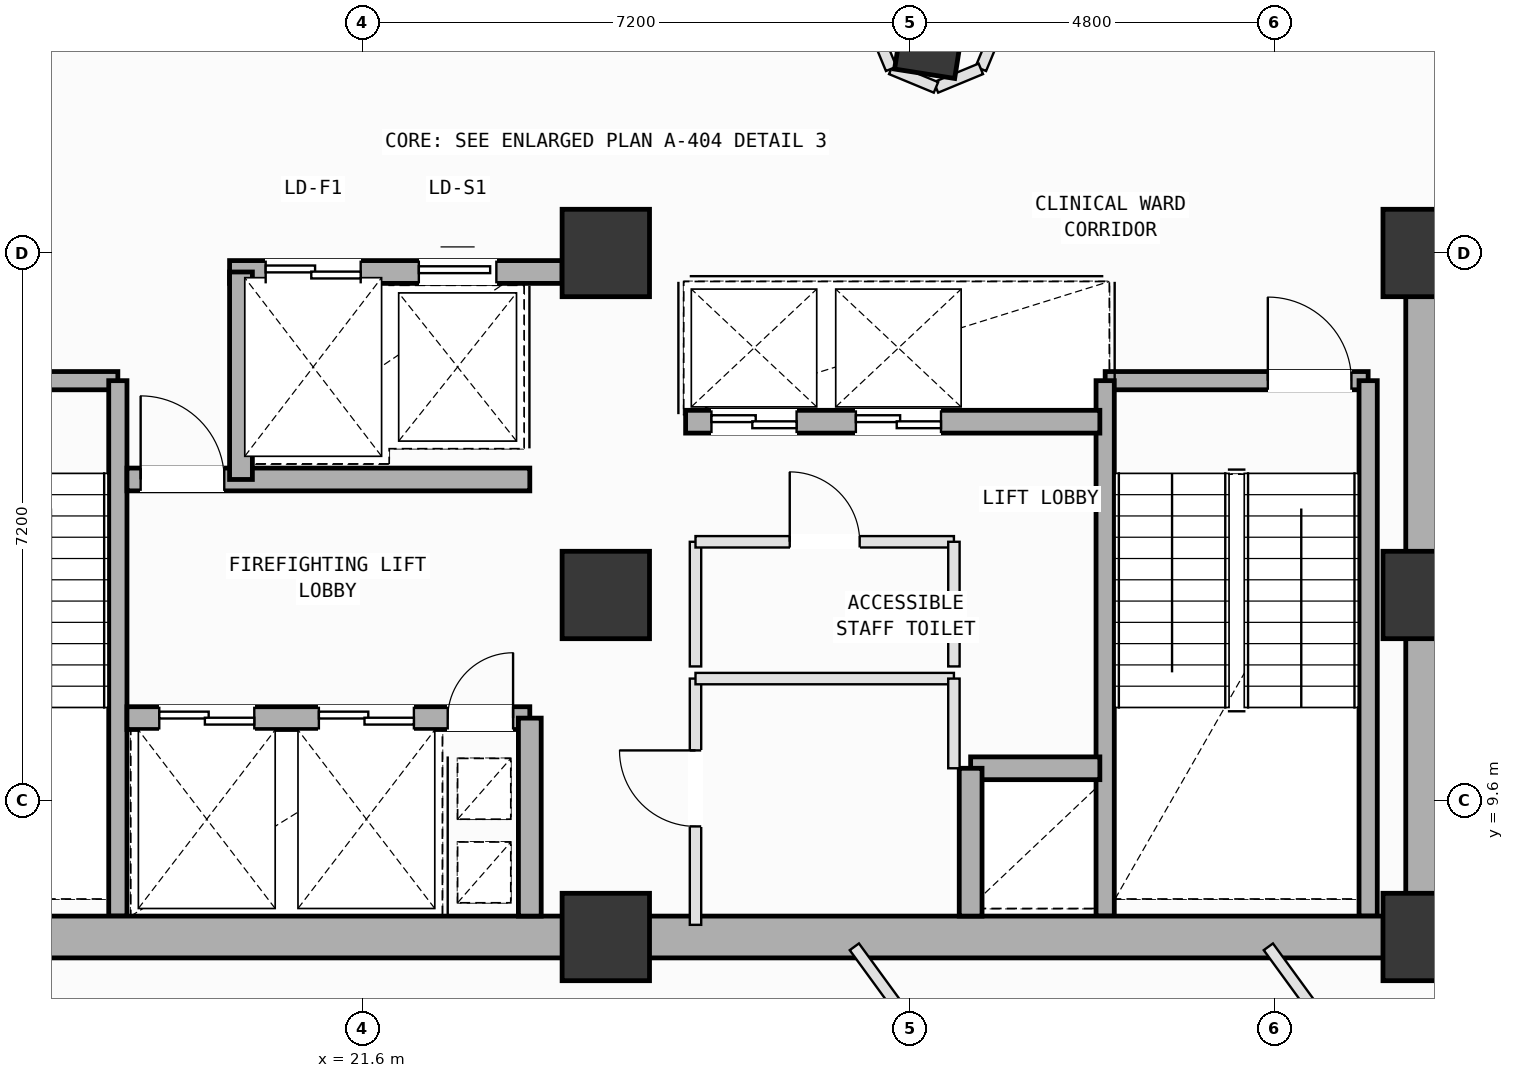
"""IFC4 building model, lengths in metres.
Left out: names, types, materials, properties, quantities, classifications, styles, units other than length and angle.
Written with IfcOpenShell. Run it as: python <this file> out.ifc"""

import sys

from ifc_helpers import new_model, si_unit, direction, frame, frame_2d, origin, origin_2d, place, context, subcontext, project, spatial, rectangle, extrude, element, fill, save


model = new_model("IFC4")
c1 = context("Model", 3, precision=1e-05, world=origin(), true_north=direction((0.0, 1.0)))
c2 = subcontext(c1, "Body", "Model", "MODEL_VIEW")
j1 = project(units=[si_unit("LENGTHUNIT", "METRE"), si_unit("PLANEANGLEUNIT", "RADIAN")], contexts=[c1])
p1 = place(None, origin())
s1 = spatial("IfcSite", under=j1, at=p1, CompositionType="ELEMENT")
p2 = place(p1, origin())
s2 = spatial("IfcBuilding", under=s1, at=p2, CompositionType="ELEMENT")
p3 = place(p2, frame((0.0, 0.0, 177.8)))
s3 = spatial("IfcBuildingStorey", under=s2, at=p3, CompositionType="ELEMENT", Elevation=177.8)
for number, where, z_axis, x_axis in (
    (1, (24.8, 7.8, 0.0), (0.0, 0.0, 1.0), (1.0, 0.0, 0.0)),
    (2, (24.8, 12.3, 0.0), (0.0, 0.0, 1.0), (1.0, 0.0, 0.0)),
    (3, (24.8, 16.8, 0.0), (0.0, 0.0, 1.0), (1.0, 0.0, 0.0)),
    (4, (35.6, 7.8, 0.0), (0.0, 0.0, 1.0), (1.0, 0.0, 0.0)),
    (5, (35.6, 12.3, 0.0), (0.0, 0.0, 1.0), (1.0, 0.0, 0.0)),
    (6, (35.6, 16.8, 0.0), (0.0, 0.0, 1.0), (1.0, 0.0, 0.0)),
):
    element("IfcColumn", number, at=place(p3, frame(where, z_axis=z_axis, x_axis=x_axis)), inside=s3, PredefinedType="COLUMN", context=c2, shape_type="SweptSolid", body=[
        extrude(rectangle(XDim=1.15, YDim=1.15, at=origin_2d()), origin(), (0.0, 0.0, 1.0), 4.0),
    ])
p4 = place(p3, frame((29.103, 19.85, 0.002), z_axis=(0.020701917139, -0.018442415858, 0.999615580073), x_axis=(-0.634495197242, 0.772441293225, 0.027391480385)))
e7 = element("IfcColumn", 7, at=p4, inside=s3, PredefinedType="COLUMN", context=c2, shape_type="SweptSolid", body=[
    extrude(rectangle(XDim=1.4, YDim=0.8, at=origin_2d()), origin(), (0.0, 0.0, 1.0), 3.998),
])
p5 = place(p3, frame((14.92, 15.12, 0.0), z_axis=(0.0, 0.0, 1.0), x_axis=(1.0, 0.0, 0.0)))
e8 = element("IfcWall", 8, at=p5, inside=s3, PredefinedType="SOLIDWALL", context=c2, shape_type="SweptSolid", body=[
    extrude(rectangle(XDim=3.46, YDim=0.24, at=frame_2d((1.73, 0.0))), origin(), (0.0, 0.0, 1.0), 3.78),
])
p6 = place(p5, frame((0.22, 0.0, 0.0)))
e9 = element("IfcOpeningElement", 9, at=p6, cuts=e8, PredefinedType="OPENING", context=c2, shape_type="SweptSolid", body=[
    extrude(rectangle(XDim=1.1, YDim=2.15, at=frame_2d((0.55, 1.075))), frame((0.0, 0.13, 0.0), z_axis=(0.0, -1.0, 0.0), x_axis=(1.0, 0.0, 0.0)), (0.0, 0.0, 1.0), 0.26),
])
p7 = place(p3, frame((18.38, 15.12, 0.0), z_axis=(0.0, 0.0, 1.0), x_axis=(0.0, -1.0, 0.0)))
e10 = element("IfcWall", 10, at=p7, inside=s3, PredefinedType="SOLIDWALL", context=c2, shape_type="SweptSolid", body=[
    extrude(rectangle(XDim=7.045, YDim=0.24, at=frame_2d((3.522, 0.0))), origin(), (0.0, 0.0, 1.0), 3.78),
])
p8 = place(p3, frame((31.37, 15.12, 0.0), z_axis=(0.0, 0.0, 1.0), x_axis=(1.0, 0.0, 0.0)))
e11 = element("IfcWall", 11, at=p8, inside=s3, PredefinedType="SOLIDWALL", context=c2, shape_type="SweptSolid", body=[
    extrude(rectangle(XDim=3.46, YDim=0.24, at=frame_2d((1.73, 0.0))), origin(), (0.0, 0.0, 1.0), 3.78),
])
p9 = place(p8, frame((2.14, 0.0, 0.0)))
e12 = element("IfcOpeningElement", 12, at=p9, cuts=e11, PredefinedType="OPENING", context=c2, shape_type="SweptSolid", body=[
    extrude(rectangle(XDim=1.1, YDim=2.15, at=frame_2d((0.55, 1.075))), frame((0.0, 0.13, 0.0), z_axis=(0.0, -1.0, 0.0), x_axis=(1.0, 0.0, 0.0)), (0.0, 0.0, 1.0), 0.26),
])
for number, where, z_axis, x_axis in (
    (13, (34.83, 15.12, 0.0), (0.0, 0.0, 1.0), (0.0, -1.0, 0.0)),
    (14, (31.37, 8.075, 0.0), (0.0, 0.0, 1.0), (0.0, 1.0, 0.0)),
):
    element("IfcWall", number, at=place(p3, frame(where, z_axis=z_axis, x_axis=x_axis)), inside=s3, PredefinedType="SOLIDWALL", context=c2, shape_type="SweptSolid", body=[
        extrude(rectangle(XDim=7.045, YDim=0.24, at=frame_2d((3.522, 0.0))), origin(), (0.0, 0.0, 1.0), 3.78),
    ])
for number, where, z_axis, x_axis in (
    (15, (14.0, 7.8, 0.0), (0.0, 0.0, 1.0), (1.0, 0.0, 0.0)),
    (16, (24.8, 7.8, 0.0), (0.0, 0.0, 1.0), (1.0, 0.0, 0.0)),
):
    element("IfcWall", number, at=place(p3, frame(where, z_axis=z_axis, x_axis=x_axis)), inside=s3, PredefinedType="SHEAR", context=c2, shape_type="SweptSolid", body=[
        extrude(rectangle(XDim=10.8, YDim=0.55, at=frame_2d((5.4, 0.0))), origin(), (0.0, 0.0, 1.0), 3.78),
    ])
p10 = place(p3, frame((35.6, 7.8, 0.0), z_axis=(0.0, 0.0, 1.0), x_axis=(0.0, 1.0, 0.0)))
e17 = element("IfcWall", 17, at=p10, inside=s3, PredefinedType="SHEAR", context=c2, shape_type="SweptSolid", body=[
    extrude(rectangle(XDim=9.0, YDim=0.55, at=frame_2d((4.5, 0.0))), origin(), (0.0, 0.0, 1.0), 3.78),
])
p11 = place(p3, frame((19.85, 16.55, 0.0), z_axis=(0.0, 0.0, 1.0), x_axis=(1.0, 0.0, 0.0)))
e18 = element("IfcWall", 18, at=p11, inside=s3, PredefinedType="SOLIDWALL", context=c2, shape_type="SweptSolid", body=[
    extrude(rectangle(XDim=4.375, YDim=0.3, at=frame_2d((2.188, 0.0))), origin(), (0.0, 0.0, 1.0), 3.78),
])
p12 = place(p11, frame((0.475, 0.0, 0.0)))
e19 = element("IfcOpeningElement", 19, at=p12, cuts=e18, PredefinedType="OPENING", context=c2, shape_type="SweptSolid", body=[
    extrude(rectangle(XDim=1.25, YDim=2.18, at=frame_2d((0.625, 1.09))), frame((0.0, 0.16, 0.0), z_axis=(0.0, -1.0, 0.0), x_axis=(1.0, 0.0, 0.0)), (0.0, 0.0, 1.0), 0.32),
])
p13 = place(p11, frame((2.49, 0.0, 0.0)))
e20 = element("IfcOpeningElement", 20, at=p13, cuts=e18, PredefinedType="OPENING", context=c2, shape_type="SweptSolid", body=[
    extrude(rectangle(XDim=1.02, YDim=2.12, at=frame_2d((0.51, 1.06))), frame((0.0, 0.16, 0.0), z_axis=(0.0, -1.0, 0.0), x_axis=(1.0, 0.0, 0.0)), (0.0, 0.0, 1.0), 0.32),
])
p14 = place(p3, frame((18.5, 10.68, 0.0), z_axis=(0.0, 0.0, 1.0), x_axis=(1.0, 0.0, 0.0)))
e21 = element("IfcWall", 21, at=p14, inside=s3, PredefinedType="SOLIDWALL", context=c2, shape_type="SweptSolid", body=[
    extrude(rectangle(XDim=5.3, YDim=0.3, at=frame_2d((2.65, 0.0))), origin(), (0.0, 0.0, 1.0), 3.78),
])
p15 = place(p14, frame((4.22, 0.0, 0.0)))
e22 = element("IfcOpeningElement", 22, at=p15, cuts=e21, PredefinedType="OPENING", context=c2, shape_type="SweptSolid", body=[
    extrude(rectangle(XDim=0.86, YDim=2.06, at=frame_2d((0.43, 1.03))), frame((0.0, 0.16, 0.0), z_axis=(0.0, -1.0, 0.0), x_axis=(1.0, 0.0, 0.0)), (0.0, 0.0, 1.0), 0.32),
])
p16 = place(p14, frame((0.425, 0.0, 0.0)))
e23 = element("IfcOpeningElement", 23, at=p16, cuts=e21, PredefinedType="OPENING", context=c2, shape_type="SweptSolid", body=[
    extrude(rectangle(XDim=1.25, YDim=2.18, at=frame_2d((0.625, 1.09))), frame((0.0, 0.16, 0.0), z_axis=(0.0, -1.0, 0.0), x_axis=(1.0, 0.0, 0.0)), (0.0, 0.0, 1.0), 0.32),
])
p17 = place(p14, frame((2.525, 0.0, 0.0)))
e24 = element("IfcOpeningElement", 24, at=p17, cuts=e21, PredefinedType="OPENING", context=c2, shape_type="SweptSolid", body=[
    extrude(rectangle(XDim=1.25, YDim=2.18, at=frame_2d((0.625, 1.09))), frame((0.0, 0.16, 0.0), z_axis=(0.0, -1.0, 0.0), x_axis=(1.0, 0.0, 0.0)), (0.0, 0.0, 1.0), 0.32),
])
p18 = place(p3, frame((18.5, 13.82, 0.0), z_axis=(0.0, 0.0, 1.0), x_axis=(1.0, 0.0, 0.0)))
e25 = element("IfcWall", 25, at=p18, inside=s3, PredefinedType="SOLIDWALL", context=c2, shape_type="SweptSolid", body=[
    extrude(rectangle(XDim=5.3, YDim=0.3, at=frame_2d((2.65, 0.0))), origin(), (0.0, 0.0, 1.0), 3.78),
])
p19 = place(p18, frame((0.18, 0.0, 0.0)))
e26 = element("IfcOpeningElement", 26, at=p19, cuts=e25, PredefinedType="OPENING", context=c2, shape_type="SweptSolid", body=[
    extrude(rectangle(XDim=1.1, YDim=2.15, at=frame_2d((0.55, 1.075))), frame((0.0, 0.16, 0.0), z_axis=(0.0, -1.0, 0.0), x_axis=(1.0, 0.0, 0.0)), (0.0, 0.0, 1.0), 0.32),
])
p20 = place(p3, frame((23.8, 8.075, 0.0), z_axis=(0.0, 0.0, 1.0), x_axis=(0.0, 1.0, 0.0)))
e27 = element("IfcWall", 27, at=p20, inside=s3, PredefinedType="SOLIDWALL", context=c2, shape_type="SweptSolid", body=[
    extrude(rectangle(XDim=2.605, YDim=0.3, at=frame_2d((1.302, 0.0))), origin(), (0.0, 0.0, 1.0), 3.78),
])
p21 = place(p3, frame((20.0, 13.82, 0.0), z_axis=(0.0, 0.0, 1.0), x_axis=(0.0, 1.0, 0.0)))
e28 = element("IfcWall", 28, at=p21, inside=s3, PredefinedType="SOLIDWALL", context=c2, shape_type="SweptSolid", body=[
    extrude(rectangle(XDim=2.73, YDim=0.3, at=frame_2d((1.365, 0.0))), origin(), (0.0, 0.0, 1.0), 3.78),
])
p22 = place(p3, frame((29.6, 10.02, 0.0), z_axis=(0.0, 0.0, 1.0), x_axis=(1.0, 0.0, 0.0)))
e29 = element("IfcWall", 29, at=p22, inside=s3, PredefinedType="SOLIDWALL", context=c2, shape_type="SweptSolid", body=[
    extrude(rectangle(XDim=1.7, YDim=0.3, at=frame_2d((0.85, 0.0))), origin(), (0.0, 0.0, 1.0), 3.78),
])
p23 = place(p3, frame((29.6, 8.075, 0.0), z_axis=(0.0, 0.0, 1.0), x_axis=(0.0, 1.0, 0.0)))
e30 = element("IfcWall", 30, at=p23, inside=s3, PredefinedType="SOLIDWALL", context=c2, shape_type="SweptSolid", body=[
    extrude(rectangle(XDim=1.945, YDim=0.3, at=frame_2d((0.973, 0.0))), origin(), (0.0, 0.0, 1.0), 3.78),
])
p24 = place(p3, frame((25.85, 14.58, 0.0), z_axis=(0.0, 0.0, 1.0), x_axis=(1.0, 0.0, 0.0)))
e31 = element("IfcWall", 31, at=p24, inside=s3, PredefinedType="SOLIDWALL", context=c2, shape_type="SweptSolid", body=[
    extrude(rectangle(XDim=5.45, YDim=0.3, at=frame_2d((2.725, 0.0))), origin(), (0.0, 0.0, 1.0), 3.78),
])
p25 = place(p24, frame((0.34, 0.0, 0.0)))
e32 = element("IfcOpeningElement", 32, at=p25, cuts=e31, PredefinedType="OPENING", context=c2, shape_type="SweptSolid", body=[
    extrude(rectangle(XDim=1.12, YDim=2.15, at=frame_2d((0.56, 1.075))), frame((0.0, 0.16, 0.0), z_axis=(0.0, -1.0, 0.0), x_axis=(1.0, 0.0, 0.0)), (0.0, 0.0, 1.0), 0.32),
])
p26 = place(p24, frame((2.24, 0.0, 0.0)))
e33 = element("IfcOpeningElement", 33, at=p26, cuts=e31, PredefinedType="OPENING", context=c2, shape_type="SweptSolid", body=[
    extrude(rectangle(XDim=1.12, YDim=2.15, at=frame_2d((0.56, 1.075))), frame((0.0, 0.16, 0.0), z_axis=(0.0, -1.0, 0.0), x_axis=(1.0, 0.0, 0.0)), (0.0, 0.0, 1.0), 0.32),
])
p27 = place(p3, frame((25.98, 7.96, 0.0), z_axis=(0.0, 0.0, 1.0), x_axis=(0.0, 1.0, 0.0)))
e34 = element("IfcWall", 34, at=p27, inside=s3, PredefinedType="PARTITIONING", context=c2, shape_type="SweptSolid", body=[
    extrude(rectangle(XDim=3.24, YDim=0.15, at=frame_2d((1.62, 0.0))), origin(), (0.0, 0.0, 1.0), 3.78),
])
p28 = place(p27, frame((1.295, 0.0, 0.0)))
e35 = element("IfcOpeningElement", 35, at=p28, cuts=e34, PredefinedType="OPENING", context=c2, shape_type="SweptSolid", body=[
    extrude(rectangle(XDim=1.0, YDim=2.12, at=frame_2d((0.5, 1.06))), frame((0.0, 0.085, 0.0), z_axis=(0.0, -1.0, 0.0), x_axis=(1.0, 0.0, 0.0)), (0.0, 0.0, 1.0), 0.17),
])
p29 = place(p3, frame((25.98, 11.2, 0.0), z_axis=(0.0, 0.0, 1.0), x_axis=(1.0, 0.0, 0.0)))
e36 = element("IfcWall", 36, at=p29, inside=s3, PredefinedType="PARTITIONING", context=c2, shape_type="SweptSolid", body=[
    extrude(rectangle(XDim=3.4, YDim=0.15, at=frame_2d((1.7, 0.0))), origin(), (0.0, 0.0, 1.0), 3.78),
])
p30 = place(p3, frame((29.38, 11.2, 0.0), z_axis=(0.0, 0.0, 1.0), x_axis=(0.0, -1.0, 0.0)))
e37 = element("IfcWall", 37, at=p30, inside=s3, PredefinedType="PARTITIONING", context=c2, shape_type="SweptSolid", body=[
    extrude(rectangle(XDim=1.18, YDim=0.15, at=frame_2d((0.59, 0.0))), origin(), (0.0, 0.0, 1.0), 3.78),
])
p31 = place(p3, frame((25.98, 11.36, 0.0), z_axis=(0.0, 0.0, 1.0), x_axis=(0.0, 1.0, 0.0)))
e38 = element("IfcWall", 38, at=p31, inside=s3, PredefinedType="PARTITIONING", context=c2, shape_type="SweptSolid", body=[
    extrude(rectangle(XDim=1.64, YDim=0.15, at=frame_2d((0.82, 0.0))), origin(), (0.0, 0.0, 1.0), 3.78),
])
p32 = place(p3, frame((25.98, 13.0, 0.0), z_axis=(0.0, 0.0, 1.0), x_axis=(1.0, 0.0, 0.0)))
e39 = element("IfcWall", 39, at=p32, inside=s3, PredefinedType="PARTITIONING", context=c2, shape_type="SweptSolid", body=[
    extrude(rectangle(XDim=3.4, YDim=0.15, at=frame_2d((1.7, 0.0))), origin(), (0.0, 0.0, 1.0), 3.78),
])
p33 = place(p32, frame((1.24, 0.0, 0.0)))
e40 = element("IfcOpeningElement", 40, at=p33, cuts=e39, PredefinedType="OPENING", context=c2, shape_type="SweptSolid", body=[
    extrude(rectangle(XDim=0.92, YDim=2.1, at=frame_2d((0.46, 1.05))), frame((0.0, 0.085, 0.0), z_axis=(0.0, -1.0, 0.0), x_axis=(1.0, 0.0, 0.0)), (0.0, 0.0, 1.0), 0.17),
])
p34 = place(p3, frame((29.38, 13.0, 0.0), z_axis=(0.0, 0.0, 1.0), x_axis=(0.0, -1.0, 0.0)))
e41 = element("IfcWall", 41, at=p34, inside=s3, PredefinedType="PARTITIONING", context=c2, shape_type="SweptSolid", body=[
    extrude(rectangle(XDim=1.64, YDim=0.15, at=frame_2d((0.82, 0.0))), origin(), (0.0, 0.0, 1.0), 3.78),
])
p35 = place(p3, frame((28.07, 7.671, 0.0), z_axis=(0.0, 0.0, 1.0), x_axis=(0.589263140304, -0.807941180705, 0.0)))
e42 = element("IfcWall", 42, at=p35, inside=s3, PredefinedType="PARTITIONING", context=c2, shape_type="SweptSolid", body=[
    extrude(rectangle(XDim=11.898, YDim=0.15, at=frame_2d((5.949, 0.0))), origin(), (0.0, 0.0, 1.0), 3.78),
])
p36 = place(p35, frame((5.704, 0.0, 0.0)))
e43 = element("IfcOpeningElement", 43, at=p36, cuts=e42, PredefinedType="OPENING", context=c2, shape_type="SweptSolid", body=[
    extrude(rectangle(XDim=0.86, YDim=2.06, at=frame_2d((0.43, 1.03))), frame((0.0, 0.085, 0.0), z_axis=(0.0, -1.0, 0.0), x_axis=(1.0, 0.0, 0.0)), (0.0, 0.0, 1.0), 0.17),
])
p37 = place(p3, frame((33.517, 7.671, 0.0), z_axis=(0.0, 0.0, 1.0), x_axis=(0.589139101628, -0.808031632384, 0.0)))
e44 = element("IfcWall", 44, at=p37, inside=s3, PredefinedType="PARTITIONING", context=c2, shape_type="SweptSolid", body=[
    extrude(rectangle(XDim=8.639, YDim=0.15, at=frame_2d((4.32, 0.0))), origin(), (0.0, 0.0, 1.0), 3.78),
])
p38 = place(p37, frame((4.075, 0.0, 0.0)))
e45 = element("IfcOpeningElement", 45, at=p38, cuts=e44, PredefinedType="OPENING", context=c2, shape_type="SweptSolid", body=[
    extrude(rectangle(XDim=0.86, YDim=2.06, at=frame_2d((0.43, 1.03))), frame((0.0, 0.085, 0.0), z_axis=(0.0, -1.0, 0.0), x_axis=(1.0, 0.0, 0.0)), (0.0, 0.0, 1.0), 0.17),
])
p39 = place(p3, frame((35.6, 7.5, 0.0), z_axis=(0.0, 0.0, 1.0), x_axis=(1.0, 0.0, 0.0)))
e46 = element("IfcWall", 46, at=p39, inside=s3, PredefinedType="PARTITIONING", context=c2, shape_type="SweptSolid", body=[
    extrude(rectangle(XDim=0.55, YDim=0.15, at=frame_2d((0.275, 0.0))), origin(), (0.0, 0.0, 1.0), 3.065),
])
p40 = place(p3, frame((29.978, 19.813, 0.0), z_axis=(0.0, 0.0, 1.0), x_axis=(-0.382306769343, -0.924035461503, 0.0)))
e47 = element("IfcWall", 47, at=p40, inside=s3, PredefinedType="PARTITIONING", context=c2, shape_type="SweptSolid", body=[
    extrude(rectangle(XDim=0.639, YDim=0.15, at=frame_2d((0.319, 0.0))), origin(), (0.0, 0.0, 1.0), 3.78),
])
p41 = place(p3, frame((29.734, 19.223, 0.0), z_axis=(0.0, 0.0, 1.0), x_axis=(-0.924114659462, -0.382115291723, 0.0)))
e48 = element("IfcWall", 48, at=p41, inside=s3, PredefinedType="PARTITIONING", context=c2, shape_type="SweptSolid", body=[
    extrude(rectangle(XDim=0.638, YDim=0.15, at=frame_2d((0.319, 0.0))), origin(), (0.0, 0.0, 1.0), 3.415),
])
p42 = place(p3, frame((29.144, 18.979, 0.0), z_axis=(0.0, 0.0, 1.0), x_axis=(-0.923946844683, 0.382520885967, 0.0)))
e49 = element("IfcWall", 49, at=p42, inside=s3, PredefinedType="PARTITIONING", context=c2, shape_type="SweptSolid", body=[
    extrude(rectangle(XDim=0.638, YDim=0.15, at=frame_2d((0.319, 0.0))), origin(), (0.0, 0.0, 1.0), 3.78),
])
p43 = place(p3, frame((28.555, 19.223, 0.0), z_axis=(0.0, 0.0, 1.0), x_axis=(-0.381980268386, 0.924170479167, 0.0)))
e50 = element("IfcWall", 50, at=p43, inside=s3, PredefinedType="PARTITIONING", context=c2, shape_type="SweptSolid", body=[
    extrude(rectangle(XDim=0.638, YDim=0.15, at=frame_2d((0.319, 0.0))), origin(), (0.0, 0.0, 1.0), 3.78),
])
p44 = place(p9, origin())
e51 = element("IfcDoor", 51, at=p44, inside=s3, OperationType="SINGLE_SWING_LEFT", PredefinedType="DOOR", context=c2, shape_type="SweptSolid", body=[
    extrude(rectangle(XDim=1.1, YDim=2.15, at=frame_2d((0.55, 1.075))), frame((0.0, 0.025, 0.0), z_axis=(0.0, -1.0, 0.0), x_axis=(1.0, 0.0, 0.0)), (0.0, 0.0, 1.0), 0.05),
])
fill(e12, e51)
p45 = place(p15, origin())
e52 = element("IfcDoor", 52, at=p45, inside=s3, OperationType="SINGLE_SWING_RIGHT", PredefinedType="DOOR", context=c2, shape_type="SweptSolid", body=[
    extrude(rectangle(XDim=0.86, YDim=2.06, at=frame_2d((0.43, 1.03))), frame((0.0, 0.025, 0.0), z_axis=(0.0, -1.0, 0.0), x_axis=(1.0, 0.0, 0.0)), (0.0, 0.0, 1.0), 0.05),
])
fill(e22, e52)
p46 = place(p19, origin())
e53 = element("IfcDoor", 53, at=p46, inside=s3, OperationType="SINGLE_SWING_LEFT", PredefinedType="DOOR", context=c2, shape_type="SweptSolid", body=[
    extrude(rectangle(XDim=1.1, YDim=2.15, at=frame_2d((0.55, 1.075))), frame((0.0, 0.025, 0.0), z_axis=(0.0, -1.0, 0.0), x_axis=(1.0, 0.0, 0.0)), (0.0, 0.0, 1.0), 0.05),
])
fill(e26, e53)
p47 = place(p16, origin())
e54 = element("IfcDoor", 54, at=p47, inside=s3, OperationType="DOUBLE_DOOR_SLIDING", PredefinedType="DOOR", context=c2, shape_type="SweptSolid", body=[
    extrude(rectangle(XDim=1.25, YDim=2.18, at=frame_2d((0.625, 1.09))), frame((0.0, 0.025, 0.0), z_axis=(0.0, -1.0, 0.0), x_axis=(1.0, 0.0, 0.0)), (0.0, 0.0, 1.0), 0.05),
])
fill(e23, e54)
p48 = place(p17, origin())
e55 = element("IfcDoor", 55, at=p48, inside=s3, OperationType="DOUBLE_DOOR_SLIDING", PredefinedType="DOOR", context=c2, shape_type="SweptSolid", body=[
    extrude(rectangle(XDim=1.25, YDim=2.18, at=frame_2d((0.625, 1.09))), frame((0.0, 0.025, 0.0), z_axis=(0.0, -1.0, 0.0), x_axis=(1.0, 0.0, 0.0)), (0.0, 0.0, 1.0), 0.05),
])
fill(e24, e55)
p49 = place(p25, origin())
e56 = element("IfcDoor", 56, at=p49, inside=s3, OperationType="DOUBLE_DOOR_SLIDING", PredefinedType="DOOR", context=c2, shape_type="SweptSolid", body=[
    extrude(rectangle(XDim=1.12, YDim=2.15, at=frame_2d((0.56, 1.075))), frame((0.0, 0.025, 0.0), z_axis=(0.0, -1.0, 0.0), x_axis=(1.0, 0.0, 0.0)), (0.0, 0.0, 1.0), 0.05),
])
fill(e32, e56)
p50 = place(p26, origin())
e57 = element("IfcDoor", 57, at=p50, inside=s3, OperationType="DOUBLE_DOOR_SLIDING", PredefinedType="DOOR", context=c2, shape_type="SweptSolid", body=[
    extrude(rectangle(XDim=1.12, YDim=2.15, at=frame_2d((0.56, 1.075))), frame((0.0, 0.025, 0.0), z_axis=(0.0, -1.0, 0.0), x_axis=(1.0, 0.0, 0.0)), (0.0, 0.0, 1.0), 0.05),
])
fill(e33, e57)
p51 = place(p12, origin())
e58 = element("IfcDoor", 58, at=p51, inside=s3, OperationType="DOUBLE_DOOR_SLIDING", PredefinedType="DOOR", context=c2, shape_type="SweptSolid", body=[
    extrude(rectangle(XDim=1.25, YDim=2.18, at=frame_2d((0.625, 1.09))), frame((0.0, 0.025, 0.0), z_axis=(0.0, -1.0, 0.0), x_axis=(1.0, 0.0, 0.0)), (0.0, 0.0, 1.0), 0.05),
])
fill(e19, e58)
p52 = place(p13, origin())
e59 = element("IfcDoor", 59, at=p52, inside=s3, OperationType="SLIDING_TO_LEFT", PredefinedType="DOOR", context=c2, shape_type="SweptSolid", body=[
    extrude(rectangle(XDim=1.02, YDim=2.12, at=frame_2d((0.51, 1.06))), frame((0.0, 0.025, 0.0), z_axis=(0.0, -1.0, 0.0), x_axis=(1.0, 0.0, 0.0)), (0.0, 0.0, 1.0), 0.05),
])
fill(e20, e59)
p53 = place(p28, origin())
e60 = element("IfcDoor", 60, at=p53, inside=s3, OperationType="SINGLE_SWING_RIGHT", PredefinedType="DOOR", context=c2, shape_type="SweptSolid", body=[
    extrude(rectangle(XDim=1.0, YDim=2.12, at=frame_2d((0.5, 1.06))), frame((0.0, 0.025, 0.0), z_axis=(0.0, -1.0, 0.0), x_axis=(1.0, 0.0, 0.0)), (0.0, 0.0, 1.0), 0.05),
])
fill(e35, e60)
p54 = place(p33, origin())
e61 = element("IfcDoor", 61, at=p54, inside=s3, OperationType="SINGLE_SWING_LEFT", PredefinedType="DOOR", context=c2, shape_type="SweptSolid", body=[
    extrude(rectangle(XDim=0.92, YDim=2.1, at=frame_2d((0.46, 1.05))), frame((0.0, 0.025, 0.0), z_axis=(0.0, -1.0, 0.0), x_axis=(1.0, 0.0, 0.0)), (0.0, 0.0, 1.0), 0.05),
])
fill(e40, e61)
save(model, sys.argv[1])
